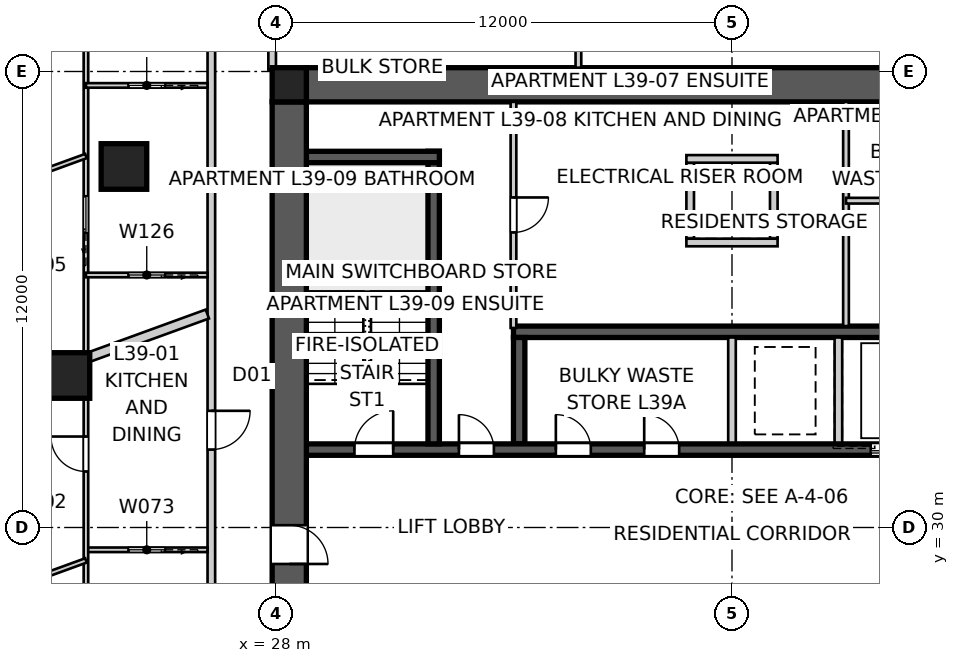
"""IFC4 building model, lengths in metres.
Left out: names, types, materials, properties, quantities, classifications, styles, units other than length and angle.
Written with IfcOpenShell. Run it as: python <this file> out.ifc"""

import sys

from ifc_helpers import new_model, si_unit, direction, frame, frame_2d, origin, origin_2d, place, context, subcontext, project, spatial, polyline, rectangle, outline, extrude, element, fill, save


model = new_model("IFC4")
c1 = context("Model", 3, precision=1e-05, world=origin(), true_north=direction((0.0, 1.0)))
c2 = subcontext(c1, "Body", "Model", "MODEL_VIEW")
j1 = project(units=[si_unit("LENGTHUNIT", "METRE"), si_unit("PLANEANGLEUNIT", "RADIAN")], contexts=[c1])
p1 = place(None, origin())
s1 = spatial("IfcSite", under=j1, at=p1, CompositionType="ELEMENT")
p2 = place(p1, origin())
s2 = spatial("IfcBuilding", under=s1, at=p2, CompositionType="ELEMENT")
p3 = place(p2, frame((0.0, 0.0, 143.8)))
s3 = spatial("IfcBuildingStorey", under=s2, at=p3, CompositionType="ELEMENT", Elevation=143.8)
p4 = place(p3, frame((28.8, 41.65, 0.0), z_axis=(0.0, 0.0, 1.0), x_axis=(1.0, 0.0, 0.0)))
e1 = element("IfcWall", 1, at=p4, inside=s3, PredefinedType="SHEAR", context=c2, shape_type="SweptSolid", body=[
    extrude(outline(polyline([(0.0, -0.45), (22.4, -0.45), (22.4, -0.025), (22.85, -0.025), (22.85, 0.025), (22.4, 0.025), (22.4, 0.45), (0.0, 0.45), (0.0, 0.025), (-0.45, 0.025), (-0.45, -0.025), (0.0, -0.025), (0.0, -0.45)])), origin(), (0.0, 0.0, 1.0), 3.4),
])
p5 = place(p3, frame((28.35, 41.2, 0.0), z_axis=(0.0, 0.0, 1.0), x_axis=(0.0, -1.0, 0.0)))
e2 = element("IfcWall", 2, at=p5, inside=s3, PredefinedType="SHEAR", context=c2, shape_type="SweptSolid", body=[
    extrude(outline(polyline([(0.0, -0.45), (22.4, -0.45), (22.4, -0.025), (22.85, -0.025), (22.85, 0.025), (22.4, 0.025), (22.4, 0.45), (0.0, 0.45), (0.0, 0.025), (-0.45, 0.025), (-0.45, -0.025), (0.0, -0.025), (0.0, -0.45)])), origin(), (0.0, 0.0, 1.0), 3.4),
])
p6 = place(p5, frame((11.14, 0.0, 0.0)))
e3 = element("IfcOpeningElement", 3, at=p6, cuts=e2, PredefinedType="OPENING", context=c2, shape_type="SweptSolid", body=[
    extrude(rectangle(XDim=1.02, YDim=2.4, at=frame_2d((0.51, 1.2))), frame((0.0, 0.46, 0.0), z_axis=(0.0, -1.0, 0.0), x_axis=(1.0, 0.0, 0.0)), (0.0, 0.0, 1.0), 0.92),
])
p7 = place(p3, frame((28.8, 32.05, 0.0), z_axis=(0.0, 0.0, 1.0), x_axis=(1.0, 0.0, 0.0)))
e4 = element("IfcWall", 4, at=p7, inside=s3, PredefinedType="SHEAR", context=c2, shape_type="SweptSolid", body=[
    extrude(rectangle(XDim=22.4, YDim=0.3, at=frame_2d((11.2, 0.0))), origin(), (0.0, 0.0, 1.0), 3.4),
])
p8 = place(p7, frame((19.04, 0.0, 0.0)))
e5 = element("IfcOpeningElement", 5, at=p8, cuts=e4, PredefinedType="OPENING", context=c2, shape_type="SweptSolid", body=[
    extrude(rectangle(XDim=0.92, YDim=2.1, at=frame_2d((0.46, 1.05))), frame((0.0, 0.16, 0.0), z_axis=(0.0, -1.0, 0.0), x_axis=(1.0, 0.0, 0.0)), (0.0, 0.0, 1.0), 0.32),
])
p9 = place(p7, frame((1.265, 0.0, 0.0)))
e6 = element("IfcOpeningElement", 6, at=p9, cuts=e4, PredefinedType="OPENING", context=c2, shape_type="SweptSolid", body=[
    extrude(rectangle(XDim=1.02, YDim=2.1, at=frame_2d((0.51, 1.05))), frame((0.0, 0.16, 0.0), z_axis=(0.0, -1.0, 0.0), x_axis=(1.0, 0.0, 0.0)), (0.0, 0.0, 1.0), 0.32),
])
p10 = place(p7, frame((4.015, 0.0, 0.0)))
e7 = element("IfcOpeningElement", 7, at=p10, cuts=e4, PredefinedType="OPENING", context=c2, shape_type="SweptSolid", body=[
    extrude(rectangle(XDim=0.92, YDim=2.1, at=frame_2d((0.46, 1.05))), frame((0.0, 0.16, 0.0), z_axis=(0.0, -1.0, 0.0), x_axis=(1.0, 0.0, 0.0)), (0.0, 0.0, 1.0), 0.32),
])
p11 = place(p7, frame((6.565, 0.0, 0.0)))
e8 = element("IfcOpeningElement", 8, at=p11, cuts=e4, PredefinedType="OPENING", context=c2, shape_type="SweptSolid", body=[
    extrude(rectangle(XDim=0.92, YDim=2.1, at=frame_2d((0.46, 1.05))), frame((0.0, 0.16, 0.0), z_axis=(0.0, -1.0, 0.0), x_axis=(1.0, 0.0, 0.0)), (0.0, 0.0, 1.0), 0.32),
])
p12 = place(p7, frame((8.89, 0.0, 0.0)))
e9 = element("IfcOpeningElement", 9, at=p12, cuts=e4, PredefinedType="OPENING", context=c2, shape_type="SweptSolid", body=[
    extrude(rectangle(XDim=0.92, YDim=2.1, at=frame_2d((0.46, 1.05))), frame((0.0, 0.16, 0.0), z_axis=(0.0, -1.0, 0.0), x_axis=(1.0, 0.0, 0.0)), (0.0, 0.0, 1.0), 0.32),
])
p13 = place(p7, frame((14.85, 0.0, 0.0)))
e10 = element("IfcOpeningElement", 10, at=p13, cuts=e4, PredefinedType="OPENING", context=c2, shape_type="SweptSolid", body=[
    extrude(rectangle(XDim=1.1, YDim=2.1, at=frame_2d((0.55, 1.05))), frame((0.0, 0.16, 0.0), z_axis=(0.0, -1.0, 0.0), x_axis=(1.0, 0.0, 0.0)), (0.0, 0.0, 1.0), 0.32),
])
p14 = place(p3, frame((34.25, 35.15, 0.0), z_axis=(0.0, 0.0, 1.0), x_axis=(1.0, 0.0, 0.0)))
e11 = element("IfcWall", 11, at=p14, inside=s3, PredefinedType="SHEAR", context=c2, shape_type="SweptSolid", body=[
    extrude(rectangle(XDim=11.5, YDim=0.3, at=frame_2d((5.75, 0.0))), origin(), (0.0, 0.0, 1.0), 3.4),
])
p15 = place(p3, frame((34.4, 32.2, 0.0), z_axis=(0.0, 0.0, 1.0), x_axis=(0.0, 1.0, 0.0)))
e12 = element("IfcWall", 12, at=p15, inside=s3, PredefinedType="SHEAR", context=c2, shape_type="SweptSolid", body=[
    extrude(rectangle(XDim=2.8, YDim=0.3, at=frame_2d((1.4, 0.0))), origin(), (0.0, 0.0, 1.0), 3.4),
])
for number, where, z_axis, x_axis in (
    (13, (40.0, 32.2, 0.0), (0.0, 0.0, 1.0), (0.0, 1.0, 0.0)),
    (14, (42.8, 32.2, 0.0), (0.0, 0.0, 1.0), (0.0, 1.0, 0.0)),
):
    element("IfcWall", number, at=place(p3, frame(where, z_axis=z_axis, x_axis=x_axis)), inside=s3, PredefinedType="SOLIDWALL", context=c2, shape_type="SweptSolid", body=[
        extrude(rectangle(XDim=2.8, YDim=0.2, at=frame_2d((1.4, 0.0))), origin(), (0.0, 0.0, 1.0), 3.4),
    ])
p16 = place(p3, frame((32.15, 32.2, 0.0), z_axis=(0.0, 0.0, 1.0), x_axis=(0.0, 1.0, 0.0)))
e15 = element("IfcWall", 15, at=p16, inside=s3, PredefinedType="SHEAR", context=c2, shape_type="SweptSolid", body=[
    extrude(rectangle(XDim=7.7, YDim=0.3, at=frame_2d((3.85, 0.0))), origin(), (0.0, 0.0, 1.0), 3.4),
])
p17 = place(p3, frame((28.8, 39.75, 0.0), z_axis=(0.0, 0.0, 1.0), x_axis=(1.0, 0.0, 0.0)))
e16 = element("IfcWall", 16, at=p17, inside=s3, PredefinedType="SHEAR", context=c2, shape_type="SweptSolid", body=[
    extrude(rectangle(XDim=3.5, YDim=0.3, at=frame_2d((1.75, 0.0))), origin(), (0.0, 0.0, 1.0), 3.4),
])
for number, where, z_axis, x_axis in (
    (17, (38.9, 37.6, 0.0), (0.0, 0.0, 1.0), (0.0, 1.0, 0.0)),
    (18, (41.1, 37.6, 0.0), (0.0, 0.0, 1.0), (0.0, 1.0, 0.0)),
):
    element("IfcWall", number, at=place(p3, frame(where, z_axis=z_axis, x_axis=x_axis)), inside=s3, PredefinedType="SOLIDWALL", context=c2, shape_type="SweptSolid", body=[
        extrude(rectangle(XDim=2.0, YDim=0.2, at=frame_2d((1.0, 0.0))), origin(), (0.0, 0.0, 1.0), 3.4),
    ])
for number, where, z_axis, x_axis in (
    (19, (38.8, 37.5, 0.0), (0.0, 0.0, 1.0), (1.0, 0.0, 0.0)),
    (20, (38.8, 39.7, 0.0), (0.0, 0.0, 1.0), (1.0, 0.0, 0.0)),
):
    element("IfcWall", number, at=place(p3, frame(where, z_axis=z_axis, x_axis=x_axis)), inside=s3, PredefinedType="SOLIDWALL", context=c2, shape_type="SweptSolid", body=[
        extrude(rectangle(XDim=2.4, YDim=0.2, at=frame_2d((1.2, 0.0))), origin(), (0.0, 0.0, 1.0), 3.4),
    ])
p18 = place(p3, frame((28.35, 41.65, 0.0), z_axis=(0.0, 0.0, 1.0), x_axis=(1.0, 0.0, 0.0)))
e21 = element("IfcColumn", 21, at=p18, inside=s3, PredefinedType="COLUMN", context=c2, shape_type="SweptSolid", body=[
    extrude(rectangle(XDim=0.9, YDim=0.9, at=origin_2d()), origin(), (0.0, 0.0, 1.0), 3.4),
])
for number, where, z_axis, x_axis in (
    (22, (24.0, 39.5, 0.0), (0.0, 0.0, 1.0), (1.0, 0.0, 0.0)),
    (23, (22.5, 34.0, 0.0), (0.0, 0.0, 1.0), (1.0, 0.0, 0.0)),
):
    element("IfcColumn", number, at=place(p3, frame(where, z_axis=z_axis, x_axis=x_axis)), inside=s3, PredefinedType="COLUMN", context=c2, shape_type="SweptSolid", body=[
        extrude(rectangle(XDim=1.2, YDim=1.2, at=origin_2d()), origin(), (0.0, 0.0, 1.0), 3.4),
    ])
p19 = place(p3, frame((26.3, 46.3, 0.0), z_axis=(0.0, 0.0, 1.0), x_axis=(0.0, -1.0, 0.0)))
e24 = element("IfcWall", 24, at=p19, inside=s3, PredefinedType="PARTITIONING", context=c2, shape_type="SweptSolid", body=[
    extrude(rectangle(XDim=33.0, YDim=0.2, at=frame_2d((16.5, 0.0))), origin(), (0.0, 0.0, 1.0), 3.25),
])
p20 = place(p19, frame((13.229, 0.0, 0.0)))
e25 = element("IfcOpeningElement", 25, at=p20, cuts=e24, PredefinedType="OPENING", context=c2, shape_type="SweptSolid", body=[
    extrude(rectangle(XDim=1.02, YDim=2.34, at=frame_2d((0.51, 1.17))), frame((0.0, 0.11, 0.0), z_axis=(0.0, -1.0, 0.0), x_axis=(1.0, 0.0, 0.0)), (0.0, 0.0, 1.0), 0.22),
])
p21 = place(p19, frame((28.51, 0.0, 0.0)))
e26 = element("IfcOpeningElement", 26, at=p21, cuts=e24, PredefinedType="OPENING", context=c2, shape_type="SweptSolid", body=[
    extrude(rectangle(XDim=1.02, YDim=2.34, at=frame_2d((0.51, 1.17))), frame((0.0, 0.11, 0.0), z_axis=(0.0, -1.0, 0.0), x_axis=(1.0, 0.0, 0.0)), (0.0, 0.0, 1.0), 0.22),
])
p22 = place(p19, frame((1.998, 0.0, 0.0)))
e27 = element("IfcOpeningElement", 27, at=p22, cuts=e24, PredefinedType="OPENING", context=c2, shape_type="SweptSolid", body=[
    extrude(rectangle(XDim=1.02, YDim=2.34, at=frame_2d((0.51, 1.17))), frame((0.0, 0.11, 0.0), z_axis=(0.0, -1.0, 0.0), x_axis=(1.0, 0.0, 0.0)), (0.0, 0.0, 1.0), 0.22),
])
p23 = place(p3, frame((14.027, 31.188, 0.0), z_axis=(0.0, 0.0, 1.0), x_axis=(0.939692090592, 0.342021600019, 0.0)))
e28 = element("IfcWall", 28, at=p23, inside=s3, PredefinedType="PARTITIONING", context=c2, shape_type="SweptSolid", body=[
    extrude(rectangle(XDim=12.949, YDim=0.25, at=frame_2d((6.474, 0.0))), origin(), (0.0, 0.0, 1.0), 3.25),
])
p24 = place(p3, frame((34.25, 41.2, 0.0), z_axis=(0.0, 0.0, 1.0), x_axis=(0.0, -1.0, 0.0)))
e29 = element("IfcWall", 29, at=p24, inside=s3, PredefinedType="SOLIDWALL", context=c2, shape_type="SweptSolid", body=[
    extrude(rectangle(XDim=5.95, YDim=0.15, at=frame_2d((2.975, 0.0))), origin(), (0.0, 0.0, 1.0), 3.25),
])
p25 = place(p24, frame((2.515, 0.0, 0.0)))
e30 = element("IfcOpeningElement", 30, at=p25, cuts=e29, PredefinedType="OPENING", context=c2, shape_type="SweptSolid", body=[
    extrude(rectangle(XDim=0.92, YDim=2.1, at=frame_2d((0.46, 1.05))), frame((0.0, 0.085, 0.0), z_axis=(0.0, -1.0, 0.0), x_axis=(1.0, 0.0, 0.0)), (0.0, 0.0, 1.0), 0.17),
])
p26 = place(p3, frame((43.0, 41.2, 0.0), z_axis=(0.0, 0.0, 1.0), x_axis=(0.0, -1.0, 0.0)))
e31 = element("IfcWall", 31, at=p26, inside=s3, PredefinedType="SOLIDWALL", context=c2, shape_type="SweptSolid", body=[
    extrude(rectangle(XDim=5.9, YDim=0.15, at=frame_2d((2.95, 0.0))), origin(), (0.0, 0.0, 1.0), 3.25),
])
p27 = place(p3, frame((43.0, 38.6, 0.0), z_axis=(0.0, 0.0, 1.0), x_axis=(1.0, 0.0, 0.0)))
e32 = element("IfcWall", 32, at=p27, inside=s3, PredefinedType="SOLIDWALL", context=c2, shape_type="SweptSolid", body=[
    extrude(rectangle(XDim=8.2, YDim=0.15, at=frame_2d((4.1, 0.0))), origin(), (0.0, 0.0, 1.0), 3.25),
])
p28 = place(p27, frame((3.64, 0.0, 0.0)))
e33 = element("IfcOpeningElement", 33, at=p28, cuts=e32, PredefinedType="OPENING", context=c2, shape_type="SweptSolid", body=[
    extrude(rectangle(XDim=0.92, YDim=2.1, at=frame_2d((0.46, 1.05))), frame((0.0, 0.085, 0.0), z_axis=(0.0, -1.0, 0.0), x_axis=(1.0, 0.0, 0.0)), (0.0, 0.0, 1.0), 0.17),
])
p29 = place(p3, frame((27.9, 44.35, 0.0), z_axis=(0.0, 0.0, 1.0), x_axis=(0.0, -1.0, 0.0)))
e34 = element("IfcWall", 34, at=p29, inside=s3, PredefinedType="PARTITIONING", context=c2, shape_type="SweptSolid", body=[
    extrude(rectangle(XDim=2.3, YDim=0.2, at=frame_2d((1.15, 0.0))), origin(), (0.0, 0.0, 1.0), 3.25),
])
p30 = place(p3, frame((35.958, 42.1, 0.0), z_axis=(0.0, 0.0, 1.0), x_axis=(0.0, 1.0, 0.0)))
e35 = element("IfcWall", 35, at=p30, inside=s3, PredefinedType="SOLIDWALL", context=c2, shape_type="SweptSolid", body=[
    extrude(rectangle(XDim=2.25, YDim=0.15, at=frame_2d((1.125, 0.0))), origin(), (0.0, 0.0, 1.0), 3.25),
])
p31 = place(p3, frame((26.2, 29.413, 0.0), z_axis=(0.0, 0.0, 1.0), x_axis=(-1.0, 0.0, 0.0)))
e36 = element("IfcWall", 36, at=p31, inside=s3, PredefinedType="PARTITIONING", context=c2, shape_type="SweptSolid", body=[
    extrude(rectangle(XDim=3.2, YDim=0.12, at=frame_2d((1.6, 0.0))), origin(), (0.0, 0.0, 1.0), 3.25),
])
p32 = place(p31, frame((1.12, 0.0, 0.0)))
e37 = element("IfcOpeningElement", 37, at=p32, cuts=e36, PredefinedType="OPENING", context=c2, shape_type="SweptSolid", body=[
    extrude(rectangle(XDim=0.96, YDim=2.1, at=frame_2d((0.48, 1.05))), frame((0.0, 0.07, 0.0), z_axis=(0.0, -1.0, 0.0), x_axis=(1.0, 0.0, 0.0)), (0.0, 0.0, 1.0), 0.14),
])
p33 = place(p3, frame((23.0, 10.8, 0.0), z_axis=(0.0, 0.0, 1.0), x_axis=(0.0, 1.0, 0.0)))
e38 = element("IfcWall", 38, at=p33, inside=s3, PredefinedType="PARTITIONING", context=c2, shape_type="SweptSolid", body=[
    extrude(rectangle(XDim=38.0, YDim=0.12, at=frame_2d((19.0, 0.0))), origin(), (0.0, 0.0, 1.0), 2.55),
])
p34 = place(p33, frame((20.674, 0.0, 0.0)))
e39 = element("IfcOpeningElement", 39, at=p34, cuts=e38, PredefinedType="OPENING", context=c2, shape_type="SweptSolid", body=[
    extrude(rectangle(XDim=0.92, YDim=2.34, at=frame_2d((0.46, 1.17))), frame((0.0, 0.07, 0.0), z_axis=(0.0, -1.0, 0.0), x_axis=(1.0, 0.0, 0.0)), (0.0, 0.0, 1.0), 0.14),
])
p35 = place(p33, frame((4.598, 0.0, 0.0)))
e40 = element("IfcOpeningElement", 40, at=p35, cuts=e38, PredefinedType="OPENING", context=c2, shape_type="SweptSolid", body=[
    extrude(rectangle(XDim=0.92, YDim=2.34, at=frame_2d((0.46, 1.17))), frame((0.0, 0.07, 0.0), z_axis=(0.0, -1.0, 0.0), x_axis=(1.0, 0.0, 0.0)), (0.0, 0.0, 1.0), 0.14),
])
p36 = place(p33, frame((8.043, 0.0, 0.0)))
e41 = element("IfcOpeningElement", 41, at=p36, cuts=e38, PredefinedType="OPENING", context=c2, shape_type="SweptSolid", body=[
    extrude(rectangle(XDim=0.92, YDim=2.34, at=frame_2d((0.46, 1.17))), frame((0.0, 0.07, 0.0), z_axis=(0.0, -1.0, 0.0), x_axis=(1.0, 0.0, 0.0)), (0.0, 0.0, 1.0), 0.14),
])
p37 = place(p33, frame((33.957, 0.0, 0.0)))
e42 = element("IfcOpeningElement", 42, at=p37, cuts=e38, PredefinedType="OPENING", context=c2, shape_type="SweptSolid", body=[
    extrude(rectangle(XDim=0.92, YDim=2.34, at=frame_2d((0.46, 1.17))), frame((0.0, 0.07, 0.0), z_axis=(0.0, -1.0, 0.0), x_axis=(1.0, 0.0, 0.0)), (0.0, 0.0, 1.0), 0.14),
])
p38 = place(p33, frame((26.957, 0.0, 0.0)))
e43 = element("IfcOpeningElement", 43, at=p38, cuts=e38, PredefinedType="OPENING", context=c2, shape_type="SweptSolid", body=[
    extrude(rectangle(XDim=0.96, YDim=2.1, at=frame_2d((0.48, 1.05))), frame((0.0, 0.07, 0.0), z_axis=(0.0, -1.0, 0.0), x_axis=(1.0, 0.0, 0.0)), (0.0, 0.0, 1.0), 0.14),
])
p39 = place(p3, frame((23.0, 29.134, 0.0), z_axis=(0.0, 0.0, 1.0), x_axis=(-0.939685835373, -0.342038785519, 0.0)))
e44 = element("IfcWall", 44, at=p39, inside=s3, PredefinedType="PARTITIONING", context=c2, shape_type="SweptSolid", body=[
    extrude(rectangle(XDim=7.689, YDim=0.12, at=frame_2d((3.844, 0.0))), origin(), (0.0, 0.0, 1.0), 3.25),
])
p40 = place(p39, frame((3.404, 0.0, 0.0)))
e45 = element("IfcOpeningElement", 45, at=p40, cuts=e44, PredefinedType="OPENING", context=c2, shape_type="SweptSolid", body=[
    extrude(rectangle(XDim=0.92, YDim=2.34, at=frame_2d((0.46, 1.17))), frame((0.0, 0.07, 0.0), z_axis=(0.0, -1.0, 0.0), x_axis=(1.0, 0.0, 0.0)), (0.0, 0.0, 1.0), 0.14),
])
p41 = place(p3, frame((26.2, 41.634, 0.0), z_axis=(0.0, 0.0, 1.0), x_axis=(-1.0, 0.0, 0.0)))
e46 = element("IfcWall", 46, at=p41, inside=s3, PredefinedType="PARTITIONING", context=c2, shape_type="SweptSolid", body=[
    extrude(rectangle(XDim=3.2, YDim=0.12, at=frame_2d((1.6, 0.0))), origin(), (0.0, 0.0, 1.0), 3.25),
])
p42 = place(p41, frame((1.12, 0.0, 0.0)))
e47 = element("IfcOpeningElement", 47, at=p42, cuts=e46, PredefinedType="OPENING", context=c2, shape_type="SweptSolid", body=[
    extrude(rectangle(XDim=0.96, YDim=2.1, at=frame_2d((0.48, 1.05))), frame((0.0, 0.07, 0.0), z_axis=(0.0, -1.0, 0.0), x_axis=(1.0, 0.0, 0.0)), (0.0, 0.0, 1.0), 0.14),
])
p43 = place(p3, frame((26.2, 36.645, 0.0), z_axis=(0.0, 0.0, 1.0), x_axis=(-1.0, 0.0, 0.0)))
e48 = element("IfcWall", 48, at=p43, inside=s3, PredefinedType="PARTITIONING", context=c2, shape_type="SweptSolid", body=[
    extrude(rectangle(XDim=3.2, YDim=0.12, at=frame_2d((1.6, 0.0))), origin(), (0.0, 0.0, 1.0), 3.25),
])
p44 = place(p43, frame((1.12, 0.0, 0.0)))
e49 = element("IfcOpeningElement", 49, at=p44, cuts=e48, PredefinedType="OPENING", context=c2, shape_type="SweptSolid", body=[
    extrude(rectangle(XDim=0.96, YDim=2.1, at=frame_2d((0.48, 1.05))), frame((0.0, 0.07, 0.0), z_axis=(0.0, -1.0, 0.0), x_axis=(1.0, 0.0, 0.0)), (0.0, 0.0, 1.0), 0.14),
])
p45 = place(p3, frame((23.0, 39.775, 0.0), z_axis=(0.0, 0.0, 1.0), x_axis=(-0.939693965364, -0.342016449105, 0.0)))
e50 = element("IfcWall", 50, at=p45, inside=s3, PredefinedType="PARTITIONING", context=c2, shape_type="SweptSolid", body=[
    extrude(rectangle(XDim=11.328, YDim=0.12, at=frame_2d((5.664, 0.0))), origin(), (0.0, 0.0, 1.0), 3.25),
])
p46 = place(p45, frame((3.812, 0.0, 0.0)))
e51 = element("IfcOpeningElement", 51, at=p46, cuts=e50, PredefinedType="OPENING", context=c2, shape_type="SweptSolid", body=[
    extrude(rectangle(XDim=0.92, YDim=2.34, at=frame_2d((0.46, 1.17))), frame((0.0, 0.07, 0.0), z_axis=(0.0, -1.0, 0.0), x_axis=(1.0, 0.0, 0.0)), (0.0, 0.0, 1.0), 0.14),
])
p47 = place(p9, origin())
e52 = element("IfcDoor", 52, at=p47, inside=s3, OperationType="SINGLE_SWING_RIGHT", PredefinedType="DOOR", context=c2, shape_type="SweptSolid", body=[
    extrude(rectangle(XDim=1.02, YDim=2.1, at=frame_2d((0.51, 1.05))), frame((0.0, 0.025, 0.0), z_axis=(0.0, -1.0, 0.0), x_axis=(1.0, 0.0, 0.0)), (0.0, 0.0, 1.0), 0.05),
])
fill(e6, e52)
p48 = place(p10, origin())
e53 = element("IfcDoor", 53, at=p48, inside=s3, OperationType="SINGLE_SWING_LEFT", PredefinedType="DOOR", context=c2, shape_type="SweptSolid", body=[
    extrude(rectangle(XDim=0.92, YDim=2.1, at=frame_2d((0.46, 1.05))), frame((0.0, 0.025, 0.0), z_axis=(0.0, -1.0, 0.0), x_axis=(1.0, 0.0, 0.0)), (0.0, 0.0, 1.0), 0.05),
])
fill(e7, e53)
p49 = place(p20, origin())
e54 = element("IfcDoor", 54, at=p49, inside=s3, OperationType="SINGLE_SWING_LEFT", PredefinedType="DOOR", context=c2, shape_type="SweptSolid", body=[
    extrude(rectangle(XDim=1.02, YDim=2.34, at=frame_2d((0.51, 1.17))), frame((0.0, 0.025, 0.0), z_axis=(0.0, -1.0, 0.0), x_axis=(1.0, 0.0, 0.0)), (0.0, 0.0, 1.0), 0.05),
])
fill(e25, e54)
p50 = place(p25, origin())
e55 = element("IfcDoor", 55, at=p50, inside=s3, OperationType="SINGLE_SWING_LEFT", PredefinedType="DOOR", context=c2, shape_type="SweptSolid", body=[
    extrude(rectangle(XDim=0.92, YDim=2.1, at=frame_2d((0.46, 1.05))), frame((0.0, 0.025, 0.0), z_axis=(0.0, -1.0, 0.0), x_axis=(1.0, 0.0, 0.0)), (0.0, 0.0, 1.0), 0.05),
])
fill(e30, e55)
p51 = place(p34, origin())
e56 = element("IfcDoor", 56, at=p51, inside=s3, OperationType="SINGLE_SWING_RIGHT", PredefinedType="DOOR", context=c2, shape_type="SweptSolid", body=[
    extrude(rectangle(XDim=0.92, YDim=2.34, at=frame_2d((0.46, 1.17))), frame((0.0, 0.025, 0.0), z_axis=(0.0, -1.0, 0.0), x_axis=(1.0, 0.0, 0.0)), (0.0, 0.0, 1.0), 0.05),
])
fill(e39, e56)
p52 = place(p32, origin())
e57 = element("IfcDoor", 57, at=p52, inside=s3, OperationType="SLIDING_TO_LEFT", PredefinedType="DOOR", context=c2, shape_type="SweptSolid", body=[
    extrude(rectangle(XDim=0.96, YDim=2.1, at=frame_2d((0.48, 1.05))), frame((0.0, 0.025, 0.0), z_axis=(0.0, -1.0, 0.0), x_axis=(1.0, 0.0, 0.0)), (0.0, 0.0, 1.0), 0.05),
])
fill(e37, e57)
p53 = place(p42, origin())
e58 = element("IfcDoor", 58, at=p53, inside=s3, OperationType="SLIDING_TO_LEFT", PredefinedType="DOOR", context=c2, shape_type="SweptSolid", body=[
    extrude(rectangle(XDim=0.96, YDim=2.1, at=frame_2d((0.48, 1.05))), frame((0.0, 0.025, 0.0), z_axis=(0.0, -1.0, 0.0), x_axis=(1.0, 0.0, 0.0)), (0.0, 0.0, 1.0), 0.05),
])
fill(e47, e58)
p54 = place(p44, origin())
e59 = element("IfcDoor", 59, at=p54, inside=s3, OperationType="SLIDING_TO_LEFT", PredefinedType="DOOR", context=c2, shape_type="SweptSolid", body=[
    extrude(rectangle(XDim=0.96, YDim=2.1, at=frame_2d((0.48, 1.05))), frame((0.0, 0.025, 0.0), z_axis=(0.0, -1.0, 0.0), x_axis=(1.0, 0.0, 0.0)), (0.0, 0.0, 1.0), 0.05),
])
fill(e49, e59)
p55 = place(p38, origin())
e60 = element("IfcDoor", 60, at=p55, inside=s3, OperationType="SLIDING_TO_LEFT", PredefinedType="DOOR", context=c2, shape_type="SweptSolid", body=[
    extrude(rectangle(XDim=0.96, YDim=2.1, at=frame_2d((0.48, 1.05))), frame((0.0, 0.025, 0.0), z_axis=(0.0, -1.0, 0.0), x_axis=(1.0, 0.0, 0.0)), (0.0, 0.0, 1.0), 0.05),
])
fill(e43, e60)
p56 = place(p11, origin())
e61 = element("IfcDoor", 61, at=p56, inside=s3, OperationType="SINGLE_SWING_LEFT", PredefinedType="DOOR", context=c2, shape_type="SweptSolid", body=[
    extrude(rectangle(XDim=0.92, YDim=2.1, at=frame_2d((0.46, 1.05))), frame((0.0, 0.025, 0.0), z_axis=(0.0, -1.0, 0.0), x_axis=(1.0, 0.0, 0.0)), (0.0, 0.0, 1.0), 0.05),
])
fill(e8, e61)
p57 = place(p12, origin())
e62 = element("IfcDoor", 62, at=p57, inside=s3, OperationType="SINGLE_SWING_LEFT", PredefinedType="DOOR", context=c2, shape_type="SweptSolid", body=[
    extrude(rectangle(XDim=0.92, YDim=2.1, at=frame_2d((0.46, 1.05))), frame((0.0, 0.025, 0.0), z_axis=(0.0, -1.0, 0.0), x_axis=(1.0, 0.0, 0.0)), (0.0, 0.0, 1.0), 0.05),
])
fill(e9, e62)
p58 = place(p6, origin())
e63 = element("IfcDoor", 63, at=p58, inside=s3, OperationType="SINGLE_SWING_RIGHT", PredefinedType="DOOR", context=c2, shape_type="SweptSolid", body=[
    extrude(rectangle(XDim=1.02, YDim=2.4, at=frame_2d((0.51, 1.2))), frame((0.0, 0.025, 0.0), z_axis=(0.0, -1.0, 0.0), x_axis=(1.0, 0.0, 0.0)), (0.0, 0.0, 1.0), 0.05),
])
fill(e3, e63)
p59 = place(p13, origin())
e64 = element("IfcDoor", 64, at=p59, inside=s3, OperationType="SLIDING_TO_LEFT", PredefinedType="DOOR", context=c2, shape_type="SweptSolid", body=[
    extrude(rectangle(XDim=1.1, YDim=2.1, at=frame_2d((0.55, 1.05))), frame((0.0, 0.025, 0.0), z_axis=(0.0, -1.0, 0.0), x_axis=(1.0, 0.0, 0.0)), (0.0, 0.0, 1.0), 0.05),
])
fill(e10, e64)
save(model, sys.argv[1])
